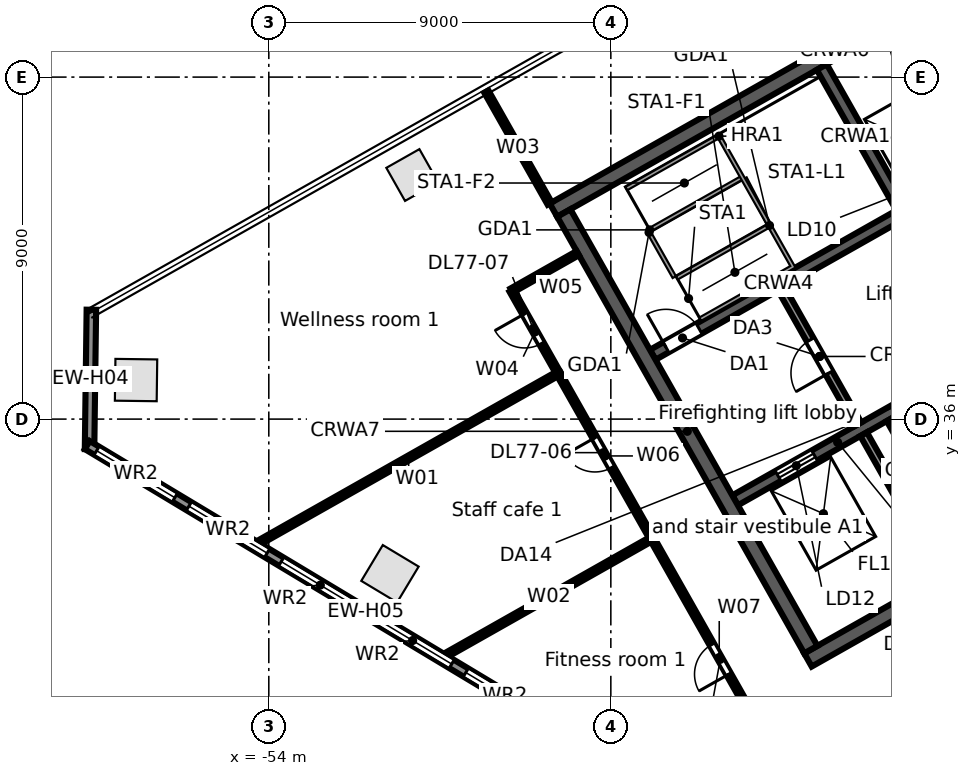
"""IFC4 building model, lengths in metres.
Left out: names, types, materials, properties, quantities, classifications, styles, units other than length and angle.
Written with IfcOpenShell. Run it as: python <this file> out.ifc"""

import sys

from ifc_helpers import new_model, si_unit, direction, frame, frame_2d, origin, origin_2d, place, context, subcontext, project, spatial, rectangle, extrude, element, fill, save


model = new_model("IFC4")
c1 = context("Model", 3, precision=1e-05, world=origin(), true_north=direction((0.0, 1.0)))
c2 = subcontext(c1, "Body", "Model", "MODEL_VIEW")
j1 = project(units=[si_unit("LENGTHUNIT", "METRE"), si_unit("PLANEANGLEUNIT", "RADIAN")], contexts=[c1])
p1 = place(None, origin())
s1 = spatial("IfcSite", under=j1, at=p1, CompositionType="ELEMENT")
p2 = place(p1, origin())
s2 = spatial("IfcBuilding", under=s1, at=p2, CompositionType="ELEMENT")
p3 = place(p2, frame((0.0, 0.0, 339.3)))
s3 = spatial("IfcBuildingStorey", under=s2, at=p3, CompositionType="ELEMENT", Elevation=339.3)
p4 = place(p3, frame((-50.226, 42.423, 0.0), z_axis=(0.0, 0.0, 1.0), x_axis=(-0.87035569594, -0.492423560103, 0.0)))
e1 = element("IfcColumn", 1, at=p4, inside=s3, PredefinedType="COLUMN", context=c2, shape_type="SweptSolid", body=[
    extrude(rectangle(XDim=1.0, YDim=1.0, at=origin_2d()), origin(), (0.0, 0.0, 1.0), 3.8),
])
for number, where, z_axis, x_axis in (
    (2, (-57.493, 37.027, 0.0), (0.0, 0.0, 1.0), (-0.013, -1.0, 0.0)),
    (3, (-50.812, 31.931, 0.0), (0.0, 0.0, 1.0), (0.857, -0.515, 0.0)),
):
    element("IfcColumn", number, at=place(p3, frame(where, z_axis=z_axis, x_axis=x_axis)), inside=s3, PredefinedType="COLUMN", context=c2, shape_type="SweptSolid", body=[
        extrude(rectangle(XDim=1.1, YDim=1.1, at=origin_2d()), origin(), (0.0, 0.0, 1.0), 3.8),
    ])
p5 = place(p3, frame((-58.717, 35.208, 0.0), z_axis=(0.0, 0.0, 1.0), x_axis=(0.01310512158, 0.999914124207, 0.0)))
e4 = element("IfcWall", 4, at=p5, inside=s3, PredefinedType="STANDARD", context=c2, shape_type="SweptSolid", body=[
    extrude(rectangle(XDim=3.67, YDim=0.25, at=frame_2d((1.835, 0.0))), origin(), (0.0, 0.0, 1.0), 3.52),
])
p6 = place(p3, frame((-44.115, 26.507, 0.0), z_axis=(0.0, 0.0, 1.0), x_axis=(-0.857166583633, 0.515039268311, 0.0)))
e5 = element("IfcWall", 5, at=p6, inside=s3, PredefinedType="STANDARD", context=c2, shape_type="SweptSolid", body=[
    extrude(rectangle(XDim=17.106, YDim=0.25, at=frame_2d((8.553, 0.0))), origin(), (0.0, 0.0, 1.0), 3.52),
])
p7 = place(p6, frame((14.417, 0.0, 0.8)))
e6 = element("IfcOpeningElement", 6, at=p7, cuts=e5, PredefinedType="OPENING", context=c2, shape_type="SweptSolid", body=[
    extrude(rectangle(XDim=2.4, YDim=2.2, at=frame_2d((1.2, 1.1))), frame((0.0, 0.135, 0.0), z_axis=(0.0, -1.0, 0.0), x_axis=(1.0, 0.0, 0.0)), (0.0, 0.0, 1.0), 0.27),
])
p8 = place(p6, frame((11.584, 0.0, 0.8)))
e7 = element("IfcOpeningElement", 7, at=p8, cuts=e5, PredefinedType="OPENING", context=c2, shape_type="SweptSolid", body=[
    extrude(rectangle(XDim=2.4, YDim=2.2, at=frame_2d((1.2, 1.1))), frame((0.0, 0.135, 0.0), z_axis=(0.0, -1.0, 0.0), x_axis=(1.0, 0.0, 0.0)), (0.0, 0.0, 1.0), 0.27),
])
p9 = place(p6, frame((8.75, 0.0, 0.8)))
e8 = element("IfcOpeningElement", 8, at=p9, cuts=e5, PredefinedType="OPENING", context=c2, shape_type="SweptSolid", body=[
    extrude(rectangle(XDim=2.4, YDim=2.2, at=frame_2d((1.2, 1.1))), frame((0.0, 0.135, 0.0), z_axis=(0.0, -1.0, 0.0), x_axis=(1.0, 0.0, 0.0)), (0.0, 0.0, 1.0), 0.27),
])
p10 = place(p6, frame((5.917, 0.0, 0.8)))
e9 = element("IfcOpeningElement", 9, at=p10, cuts=e5, PredefinedType="OPENING", context=c2, shape_type="SweptSolid", body=[
    extrude(rectangle(XDim=2.4, YDim=2.2, at=frame_2d((1.2, 1.1))), frame((0.0, 0.135, 0.0), z_axis=(0.0, -1.0, 0.0), x_axis=(1.0, 0.0, 0.0)), (0.0, 0.0, 1.0), 0.27),
])
p11 = place(p6, frame((3.084, 0.0, 0.8)))
e10 = element("IfcOpeningElement", 10, at=p11, cuts=e5, PredefinedType="OPENING", context=c2, shape_type="SweptSolid", body=[
    extrude(rectangle(XDim=2.4, YDim=2.2, at=frame_2d((1.2, 1.1))), frame((0.0, 0.135, 0.0), z_axis=(0.0, -1.0, 0.0), x_axis=(1.0, 0.0, 0.0)), (0.0, 0.0, 1.0), 0.27),
])
p12 = place(p6, frame((0.25, 0.0, 0.8)))
e11 = element("IfcOpeningElement", 11, at=p12, cuts=e5, PredefinedType="OPENING", context=c2, shape_type="SweptSolid", body=[
    extrude(rectangle(XDim=2.4, YDim=2.2, at=frame_2d((1.2, 1.1))), frame((0.0, 0.135, 0.0), z_axis=(0.0, -1.0, 0.0), x_axis=(1.0, 0.0, 0.0)), (0.0, 0.0, 1.0), 0.27),
])
p13 = place(p3, frame((-3.017, 46.293, 0.0), z_axis=(0.0, 0.0, 1.0), x_axis=(-0.870355474887, -0.492423950812, 0.0)))
e12 = element("IfcWall", 12, at=p13, inside=s3, PredefinedType="STANDARD", context=c2, shape_type="SweptSolid", body=[
    extrude(rectangle(XDim=40.34, YDim=0.25, at=frame_2d((20.17, 0.0))), origin(), (0.0, 0.0, 1.0), 3.52),
])
p14 = place(p13, frame((37.428, 0.0, 0.8)))
e13 = element("IfcOpeningElement", 13, at=p14, cuts=e12, PredefinedType="OPENING", context=c2, shape_type="SweptSolid", body=[
    extrude(rectangle(XDim=2.4, YDim=2.2, at=frame_2d((1.2, 1.1))), frame((0.0, 0.135, 0.0), z_axis=(0.0, -1.0, 0.0), x_axis=(1.0, 0.0, 0.0)), (0.0, 0.0, 1.0), 0.27),
])
p15 = place(p13, frame((34.372, 0.0, 0.0)))
e14 = element("IfcOpeningElement", 14, at=p15, cuts=e12, PredefinedType="OPENING", context=c2, shape_type="SweptSolid", body=[
    extrude(rectangle(XDim=1.8, YDim=2.4, at=frame_2d((0.9, 1.2))), frame((0.0, 0.135, 0.0), z_axis=(0.0, -1.0, 0.0), x_axis=(1.0, 0.0, 0.0)), (0.0, 0.0, 1.0), 0.27),
])
p16 = place(p13, frame((30.716, 0.0, 0.8)))
e15 = element("IfcOpeningElement", 15, at=p16, cuts=e12, PredefinedType="OPENING", context=c2, shape_type="SweptSolid", body=[
    extrude(rectangle(XDim=2.4, YDim=2.2, at=frame_2d((1.2, 1.1))), frame((0.0, 0.135, 0.0), z_axis=(0.0, -1.0, 0.0), x_axis=(1.0, 0.0, 0.0)), (0.0, 0.0, 1.0), 0.27),
])
p17 = place(p13, frame((27.36, 0.0, 0.8)))
e16 = element("IfcOpeningElement", 16, at=p17, cuts=e12, PredefinedType="OPENING", context=c2, shape_type="SweptSolid", body=[
    extrude(rectangle(XDim=2.4, YDim=2.2, at=frame_2d((1.2, 1.1))), frame((0.0, 0.135, 0.0), z_axis=(0.0, -1.0, 0.0), x_axis=(1.0, 0.0, 0.0)), (0.0, 0.0, 1.0), 0.27),
])
p18 = place(p13, frame((24.304, 0.0, 0.0)))
e17 = element("IfcOpeningElement", 17, at=p18, cuts=e12, PredefinedType="OPENING", context=c2, shape_type="SweptSolid", body=[
    extrude(rectangle(XDim=1.8, YDim=2.4, at=frame_2d((0.9, 1.2))), frame((0.0, 0.135, 0.0), z_axis=(0.0, -1.0, 0.0), x_axis=(1.0, 0.0, 0.0)), (0.0, 0.0, 1.0), 0.27),
])
p19 = place(p13, frame((20.648, 0.0, 0.8)))
e18 = element("IfcOpeningElement", 18, at=p19, cuts=e12, PredefinedType="OPENING", context=c2, shape_type="SweptSolid", body=[
    extrude(rectangle(XDim=2.4, YDim=2.2, at=frame_2d((1.2, 1.1))), frame((0.0, 0.135, 0.0), z_axis=(0.0, -1.0, 0.0), x_axis=(1.0, 0.0, 0.0)), (0.0, 0.0, 1.0), 0.27),
])
p20 = place(p13, frame((17.292, 0.0, 0.8)))
e19 = element("IfcOpeningElement", 19, at=p20, cuts=e12, PredefinedType="OPENING", context=c2, shape_type="SweptSolid", body=[
    extrude(rectangle(XDim=2.4, YDim=2.2, at=frame_2d((1.2, 1.1))), frame((0.0, 0.135, 0.0), z_axis=(0.0, -1.0, 0.0), x_axis=(1.0, 0.0, 0.0)), (0.0, 0.0, 1.0), 0.27),
])
p21 = place(p13, frame((14.236, 0.0, 0.0)))
e20 = element("IfcOpeningElement", 20, at=p21, cuts=e12, PredefinedType="OPENING", context=c2, shape_type="SweptSolid", body=[
    extrude(rectangle(XDim=1.8, YDim=2.4, at=frame_2d((0.9, 1.2))), frame((0.0, 0.135, 0.0), z_axis=(0.0, -1.0, 0.0), x_axis=(1.0, 0.0, 0.0)), (0.0, 0.0, 1.0), 0.27),
])
p22 = place(p13, frame((10.58, 0.0, 0.8)))
e21 = element("IfcOpeningElement", 21, at=p22, cuts=e12, PredefinedType="OPENING", context=c2, shape_type="SweptSolid", body=[
    extrude(rectangle(XDim=2.4, YDim=2.2, at=frame_2d((1.2, 1.1))), frame((0.0, 0.135, 0.0), z_axis=(0.0, -1.0, 0.0), x_axis=(1.0, 0.0, 0.0)), (0.0, 0.0, 1.0), 0.27),
])
p23 = place(p13, frame((7.224, 0.0, 0.8)))
e22 = element("IfcOpeningElement", 22, at=p23, cuts=e12, PredefinedType="OPENING", context=c2, shape_type="SweptSolid", body=[
    extrude(rectangle(XDim=2.4, YDim=2.2, at=frame_2d((1.2, 1.1))), frame((0.0, 0.135, 0.0), z_axis=(0.0, -1.0, 0.0), x_axis=(1.0, 0.0, 0.0)), (0.0, 0.0, 1.0), 0.27),
])
p24 = place(p13, frame((4.168, 0.0, 0.0)))
e23 = element("IfcOpeningElement", 23, at=p24, cuts=e12, PredefinedType="OPENING", context=c2, shape_type="SweptSolid", body=[
    extrude(rectangle(XDim=1.8, YDim=2.4, at=frame_2d((0.9, 1.2))), frame((0.0, 0.135, 0.0), z_axis=(0.0, -1.0, 0.0), x_axis=(1.0, 0.0, 0.0)), (0.0, 0.0, 1.0), 0.27),
])
p25 = place(p13, frame((0.512, 0.0, 0.8)))
e24 = element("IfcOpeningElement", 24, at=p25, cuts=e12, PredefinedType="OPENING", context=c2, shape_type="SweptSolid", body=[
    extrude(rectangle(XDim=2.4, YDim=2.2, at=frame_2d((1.2, 1.1))), frame((0.0, 0.135, 0.0), z_axis=(0.0, -1.0, 0.0), x_axis=(1.0, 0.0, 0.0)), (0.0, 0.0, 1.0), 0.27),
])
p26 = place(p3, frame((-39.813, 29.662, 0.0), z_axis=(0.0, 0.0, 1.0), x_axis=(0.870350116061, 0.492433422375, 0.0)))
e25 = element("IfcWall", 25, at=p26, inside=s3, PredefinedType="SOLIDWALL", context=c2, shape_type="SweptSolid", body=[
    extrude(rectangle(XDim=17.0, YDim=0.4, at=frame_2d((8.5, 0.0))), origin(), (0.0, 0.0, 1.0), 3.52),
])
p27 = place(p26, frame((7.2, 0.0, 0.0)))
e26 = element("IfcOpeningElement", 26, at=p27, cuts=e25, PredefinedType="OPENING", context=c2, shape_type="SweptSolid", body=[
    extrude(rectangle(XDim=1.2, YDim=2.1, at=frame_2d((0.6, 1.05))), frame((0.0, 0.21, 0.0), z_axis=(0.0, -1.0, 0.0), x_axis=(1.0, 0.0, 0.0)), (0.0, 0.0, 1.0), 0.42),
])
p28 = place(p3, frame((-41.73, 33.863, 0.0), z_axis=(0.0, 0.0, 1.0), x_axis=(0.870350800578, 0.492432212525, 0.0)))
e27 = element("IfcWall", 27, at=p28, inside=s3, PredefinedType="SOLIDWALL", context=c2, shape_type="SweptSolid", body=[
    extrude(rectangle(XDim=6.2, YDim=0.3, at=frame_2d((3.1, 0.0))), origin(), (0.0, 0.0, 1.0), 3.52),
])
p29 = place(p28, frame((1.3, 0.0, 0.0)))
e28 = element("IfcOpeningElement", 28, at=p29, cuts=e27, PredefinedType="OPENING", context=c2, shape_type="SweptSolid", body=[
    extrude(rectangle(XDim=1.1, YDim=2.1, at=frame_2d((0.55, 1.05))), frame((0.0, 0.16, 0.0), z_axis=(0.0, -1.0, 0.0), x_axis=(1.0, 0.0, 0.0)), (0.0, 0.0, 1.0), 0.32),
])
p30 = place(p28, frame((4.95, 0.0, 0.0)))
e29 = element("IfcOpeningElement", 29, at=p30, cuts=e27, PredefinedType="OPENING", context=c2, shape_type="SweptSolid", body=[
    extrude(rectangle(XDim=0.9, YDim=2.1, at=frame_2d((0.45, 1.05))), frame((0.0, 0.16, 0.0), z_axis=(0.0, -1.0, 0.0), x_axis=(1.0, 0.0, 0.0)), (0.0, 0.0, 1.0), 0.32),
])
p31 = place(p3, frame((-43.897, 37.692, 0.0), z_axis=(0.0, 0.0, 1.0), x_axis=(0.870356351998, 0.492422400523, 0.0)))
e30 = element("IfcWall", 30, at=p31, inside=s3, PredefinedType="SOLIDWALL", context=c2, shape_type="SweptSolid", body=[
    extrude(rectangle(XDim=7.6, YDim=0.3, at=frame_2d((3.8, 0.0))), origin(), (0.0, 0.0, 1.0), 3.52),
])
p32 = place(p31, frame((0.4, 0.0, 0.0)))
e31 = element("IfcOpeningElement", 31, at=p32, cuts=e30, PredefinedType="OPENING", context=c2, shape_type="SweptSolid", body=[
    extrude(rectangle(XDim=1.0, YDim=2.1, at=frame_2d((0.5, 1.05))), frame((0.0, 0.16, 0.0), z_axis=(0.0, -1.0, 0.0), x_axis=(1.0, 0.0, 0.0)), (0.0, 0.0, 1.0), 0.32),
])
p33 = place(p3, frame((-46.51, 41.499, 0.0), z_axis=(0.0, 0.0, 1.0), x_axis=(0.870356271124, 0.492422543467, 0.0)))
e32 = element("IfcWall", 32, at=p33, inside=s3, PredefinedType="SOLIDWALL", context=c2, shape_type="SweptSolid", body=[
    extrude(rectangle(XDim=17.0, YDim=0.4, at=frame_2d((8.5, 0.0))), origin(), (0.0, 0.0, 1.0), 3.52),
])
p34 = place(p3, frame((-46.238, 41.423, 0.0), z_axis=(0.0, 0.0, 1.0), x_axis=(0.492421663121, -0.870356769198, 0.0)))
e33 = element("IfcWall", 33, at=p34, inside=s3, PredefinedType="SOLIDWALL", context=c2, shape_type="SweptSolid", body=[
    extrude(rectangle(XDim=13.2, YDim=0.4, at=frame_2d((6.6, 0.0))), origin(), (0.0, 0.0, 1.0), 3.52),
])
p35 = place(p3, frame((-38.349, 35.603, 0.0), z_axis=(0.0, 0.0, 1.0), x_axis=(0.492397924348, -0.870370199454, 0.0)))
e34 = element("IfcWall", 34, at=p35, inside=s3, PredefinedType="SOLIDWALL", context=c2, shape_type="SweptSolid", body=[
    extrude(rectangle(XDim=4.25, YDim=0.2, at=frame_2d((2.125, 0.0))), origin(), (0.0, 0.0, 1.0), 3.52),
])
p36 = place(p3, frame((-40.516, 39.433, 0.0), z_axis=(0.0, 0.0, 1.0), x_axis=(0.492453559952, -0.87033872216, 0.0)))
e35 = element("IfcWall", 35, at=p36, inside=s3, PredefinedType="PARTITIONING", context=c2, shape_type="SweptSolid", body=[
    extrude(rectangle(XDim=4.1, YDim=0.2, at=frame_2d((2.05, 0.0))), origin(), (0.0, 0.0, 1.0), 3.52),
])
p37 = place(p36, frame((1.55, 0.0, 0.0)))
e36 = element("IfcOpeningElement", 36, at=p37, cuts=e35, PredefinedType="OPENING", context=c2, shape_type="SweptSolid", body=[
    extrude(rectangle(XDim=1.0, YDim=2.1, at=frame_2d((0.5, 1.05))), frame((0.0, 0.11, 0.0), z_axis=(0.0, -1.0, 0.0), x_axis=(1.0, 0.0, 0.0)), (0.0, 0.0, 1.0), 0.22),
])
p38 = place(p3, frame((-37.653, 35.997, 0.0), z_axis=(0.0, 0.0, 1.0), x_axis=(0.492422543467, -0.870356271124, 0.0)))
e37 = element("IfcWall", 37, at=p38, inside=s3, PredefinedType="SOLIDWALL", context=c2, shape_type="SweptSolid", body=[
    extrude(rectangle(XDim=4.25, YDim=0.2, at=frame_2d((2.125, 0.0))), origin(), (0.0, 0.0, 1.0), 3.52),
])
p39 = place(p3, frame((-39.449, 45.264, 0.0), z_axis=(0.0, 0.0, 1.0), x_axis=(0.492422543467, -0.870356271124, 0.0)))
e38 = element("IfcWall", 38, at=p39, inside=s3, PredefinedType="SOLIDWALL", context=c2, shape_type="SweptSolid", body=[
    extrude(rectangle(XDim=4.25, YDim=0.3, at=frame_2d((2.125, 0.0))), origin(), (0.0, 0.0, 1.0), 3.52),
])
p40 = place(p3, frame((-54.26, 32.749, 0.0), z_axis=(0.0, 0.0, 1.0), x_axis=(0.870418654615, 0.492312264419, 0.0)))
e39 = element("IfcWall", 39, at=p40, inside=s3, PredefinedType="PARTITIONING", context=c2, shape_type="SweptSolid", body=[
    extrude(rectangle(XDim=9.053, YDim=0.125, at=frame_2d((4.527, 0.0))), origin(), (0.0, 0.0, 1.0), 2.8),
])
p41 = place(p3, frame((-49.335, 29.79, 0.0), z_axis=(0.0, 0.0, 1.0), x_axis=(0.870383085237, 0.492375146542, 0.0)))
e40 = element("IfcWall", 40, at=p41, inside=s3, PredefinedType="PARTITIONING", context=c2, shape_type="SweptSolid", body=[
    extrude(rectangle(XDim=6.225, YDim=0.125, at=frame_2d((3.112, 0.0))), origin(), (0.0, 0.0, 1.0), 2.8),
])
p42 = place(p3, frame((-48.275, 44.618, 0.0), z_axis=(0.0, 0.0, 1.0), x_axis=(0.492404360331, -0.870366558369, 0.0)))
e41 = element("IfcWall", 41, at=p42, inside=s3, PredefinedType="PARTITIONING", context=c2, shape_type="SweptSolid", body=[
    extrude(rectangle(XDim=3.384, YDim=0.125, at=frame_2d((1.692, 0.0))), origin(), (0.0, 0.0, 1.0), 2.888),
])
p43 = place(p3, frame((-47.611, 39.382, 0.0), z_axis=(0.0, 0.0, 1.0), x_axis=(0.49244332707, -0.870344512032, 0.0)))
e42 = element("IfcWall", 42, at=p43, inside=s3, PredefinedType="PARTITIONING", context=c2, shape_type="SweptSolid", body=[
    extrude(rectangle(XDim=2.5, YDim=0.125, at=frame_2d((1.25, 0.0))), origin(), (0.0, 0.0, 1.0), 3.52),
])
p44 = place(p43, frame((0.7, 0.0, 0.0)))
e43 = element("IfcOpeningElement", 43, at=p44, cuts=e42, PredefinedType="OPENING", context=c2, shape_type="SweptSolid", body=[
    extrude(rectangle(XDim=0.9, YDim=2.1, at=frame_2d((0.45, 1.05))), frame((0.0, 0.073, 0.0), z_axis=(0.0, -1.0, 0.0), x_axis=(1.0, 0.0, 0.0)), (0.0, 0.0, 1.0), 0.145),
])
p45 = place(p3, frame((-47.611, 39.382, 0.0), z_axis=(0.0, 0.0, 1.0), x_axis=(0.870383193662, 0.492374954878, 0.0)))
e44 = element("IfcWall", 44, at=p45, inside=s3, PredefinedType="PARTITIONING", context=c2, shape_type="SweptSolid", body=[
    extrude(rectangle(XDim=2.0, YDim=0.125, at=frame_2d((1.0, 0.0))), origin(), (0.0, 0.0, 1.0), 3.52),
])
p46 = place(p3, frame((-46.38, 37.206, 0.0), z_axis=(0.0, 0.0, 1.0), x_axis=(0.49260101091, -0.870255275221, 0.0)))
e45 = element("IfcWall", 45, at=p46, inside=s3, PredefinedType="PARTITIONING", context=c2, shape_type="SweptSolid", body=[
    extrude(rectangle(XDim=5.0, YDim=0.125, at=frame_2d((2.5, 0.0))), origin(), (0.0, 0.0, 1.0), 2.8),
])
p47 = place(p46, frame((1.95, 0.0, 0.0)))
e46 = element("IfcOpeningElement", 46, at=p47, cuts=e45, PredefinedType="OPENING", context=c2, shape_type="SweptSolid", body=[
    extrude(rectangle(XDim=0.9, YDim=2.1, at=frame_2d((0.45, 1.05))), frame((0.0, 0.073, 0.0), z_axis=(0.0, -1.0, 0.0), x_axis=(1.0, 0.0, 0.0)), (0.0, 0.0, 1.0), 0.145),
])
p48 = place(p3, frame((-43.917, 32.855, 0.0), z_axis=(0.0, 0.0, 1.0), x_axis=(0.492446757002, -0.870342571358, 0.0)))
e47 = element("IfcWall", 47, at=p48, inside=s3, PredefinedType="PARTITIONING", context=c2, shape_type="SweptSolid", body=[
    extrude(rectangle(XDim=7.187, YDim=0.125, at=frame_2d((3.593, 0.0))), origin(), (0.0, 0.0, 1.0), 2.8),
])
p49 = place(p48, frame((3.2, 0.0, 0.0)))
e48 = element("IfcOpeningElement", 48, at=p49, cuts=e47, PredefinedType="OPENING", context=c2, shape_type="SweptSolid", body=[
    extrude(rectangle(XDim=0.9, YDim=2.1, at=frame_2d((0.45, 1.05))), frame((0.0, 0.073, 0.0), z_axis=(0.0, -1.0, 0.0), x_axis=(1.0, 0.0, 0.0)), (0.0, 0.0, 1.0), 0.145),
])
p50 = place(p7, origin())
e49 = element("IfcWindow", 49, at=p50, inside=s3, PartitioningType="SINGLE_PANEL", PredefinedType="WINDOW", context=c2, shape_type="SweptSolid", body=[
    extrude(rectangle(XDim=2.4, YDim=2.2, at=frame_2d((1.2, 1.1))), frame((0.0, 0.03, 0.0), z_axis=(0.0, -1.0, 0.0), x_axis=(1.0, 0.0, 0.0)), (0.0, 0.0, 1.0), 0.06),
])
fill(e6, e49)
p51 = place(p8, origin())
e50 = element("IfcWindow", 50, at=p51, inside=s3, PartitioningType="SINGLE_PANEL", PredefinedType="WINDOW", context=c2, shape_type="SweptSolid", body=[
    extrude(rectangle(XDim=2.4, YDim=2.2, at=frame_2d((1.2, 1.1))), frame((0.0, 0.03, 0.0), z_axis=(0.0, -1.0, 0.0), x_axis=(1.0, 0.0, 0.0)), (0.0, 0.0, 1.0), 0.06),
])
fill(e7, e50)
p52 = place(p9, origin())
e51 = element("IfcWindow", 51, at=p52, inside=s3, PartitioningType="SINGLE_PANEL", PredefinedType="WINDOW", context=c2, shape_type="SweptSolid", body=[
    extrude(rectangle(XDim=2.4, YDim=2.2, at=frame_2d((1.2, 1.1))), frame((0.0, 0.03, 0.0), z_axis=(0.0, -1.0, 0.0), x_axis=(1.0, 0.0, 0.0)), (0.0, 0.0, 1.0), 0.06),
])
fill(e8, e51)
p53 = place(p10, origin())
e52 = element("IfcWindow", 52, at=p53, inside=s3, PartitioningType="SINGLE_PANEL", PredefinedType="WINDOW", context=c2, shape_type="SweptSolid", body=[
    extrude(rectangle(XDim=2.4, YDim=2.2, at=frame_2d((1.2, 1.1))), frame((0.0, 0.03, 0.0), z_axis=(0.0, -1.0, 0.0), x_axis=(1.0, 0.0, 0.0)), (0.0, 0.0, 1.0), 0.06),
])
fill(e9, e52)
p54 = place(p11, origin())
e53 = element("IfcWindow", 53, at=p54, inside=s3, PartitioningType="SINGLE_PANEL", PredefinedType="WINDOW", context=c2, shape_type="SweptSolid", body=[
    extrude(rectangle(XDim=2.4, YDim=2.2, at=frame_2d((1.2, 1.1))), frame((0.0, 0.03, 0.0), z_axis=(0.0, -1.0, 0.0), x_axis=(1.0, 0.0, 0.0)), (0.0, 0.0, 1.0), 0.06),
])
fill(e10, e53)
p55 = place(p29, origin())
e54 = element("IfcDoor", 54, at=p55, inside=s3, OperationType="DOUBLE_DOOR_SLIDING", PredefinedType="DOOR", context=c2, shape_type="SweptSolid", body=[
    extrude(rectangle(XDim=1.1, YDim=2.1, at=frame_2d((0.55, 1.05))), frame((0.0, 0.025, 0.0), z_axis=(0.0, -1.0, 0.0), x_axis=(1.0, 0.0, 0.0)), (0.0, 0.0, 1.0), 0.05),
])
fill(e28, e54)
p56 = place(p32, origin())
e55 = element("IfcDoor", 55, at=p56, inside=s3, OperationType="SINGLE_SWING_LEFT", PredefinedType="DOOR", context=c2, shape_type="SweptSolid", body=[
    extrude(rectangle(XDim=1.0, YDim=2.1, at=frame_2d((0.5, 1.05))), frame((0.0, 0.025, 0.0), z_axis=(0.0, -1.0, 0.0), x_axis=(1.0, 0.0, 0.0)), (0.0, 0.0, 1.0), 0.05),
])
fill(e31, e55)
p57 = place(p37, frame((1.0, 0.0, 0.0), z_axis=(0.0, 0.0, 1.0), x_axis=(-1.0, 0.0, 0.0)))
e56 = element("IfcDoor", 56, at=p57, inside=s3, OperationType="SINGLE_SWING_LEFT", PredefinedType="DOOR", context=c2, shape_type="SweptSolid", body=[
    extrude(rectangle(XDim=1.0, YDim=2.1, at=frame_2d((0.5, 1.05))), frame((0.0, 0.025, 0.0), z_axis=(0.0, -1.0, 0.0), x_axis=(1.0, 0.0, 0.0)), (0.0, 0.0, 1.0), 0.05),
])
fill(e36, e56)
p58 = place(p49, frame((0.9, 0.0, 0.0), z_axis=(0.0, 0.0, 1.0), x_axis=(-1.0, 0.0, 0.0)))
e57 = element("IfcDoor", 57, at=p58, inside=s3, OperationType="SINGLE_SWING_LEFT", PredefinedType="DOOR", context=c2, shape_type="SweptSolid", body=[
    extrude(rectangle(XDim=0.9, YDim=2.1, at=frame_2d((0.45, 1.05))), frame((0.0, 0.025, 0.0), z_axis=(0.0, -1.0, 0.0), x_axis=(1.0, 0.0, 0.0)), (0.0, 0.0, 1.0), 0.05),
])
fill(e48, e57)
p59 = place(p47, frame((0.9, 0.0, 0.0), z_axis=(0.0, 0.0, 1.0), x_axis=(-1.0, 0.0, 0.0)))
e58 = element("IfcDoor", 58, at=p59, inside=s3, OperationType="SINGLE_SWING_RIGHT", PredefinedType="DOOR", context=c2, shape_type="SweptSolid", body=[
    extrude(rectangle(XDim=0.9, YDim=2.1, at=frame_2d((0.45, 1.05))), frame((0.0, 0.025, 0.0), z_axis=(0.0, -1.0, 0.0), x_axis=(1.0, 0.0, 0.0)), (0.0, 0.0, 1.0), 0.05),
])
fill(e46, e58)
p60 = place(p44, frame((0.9, 0.0, 0.0), z_axis=(0.0, 0.0, 1.0), x_axis=(-1.0, 0.0, 0.0)))
e59 = element("IfcDoor", 59, at=p60, inside=s3, OperationType="SINGLE_SWING_RIGHT", PredefinedType="DOOR", context=c2, shape_type="SweptSolid", body=[
    extrude(rectangle(XDim=0.9, YDim=2.1, at=frame_2d((0.45, 1.05))), frame((0.0, 0.025, 0.0), z_axis=(0.0, -1.0, 0.0), x_axis=(1.0, 0.0, 0.0)), (0.0, 0.0, 1.0), 0.05),
])
fill(e43, e59)
save(model, sys.argv[1])
